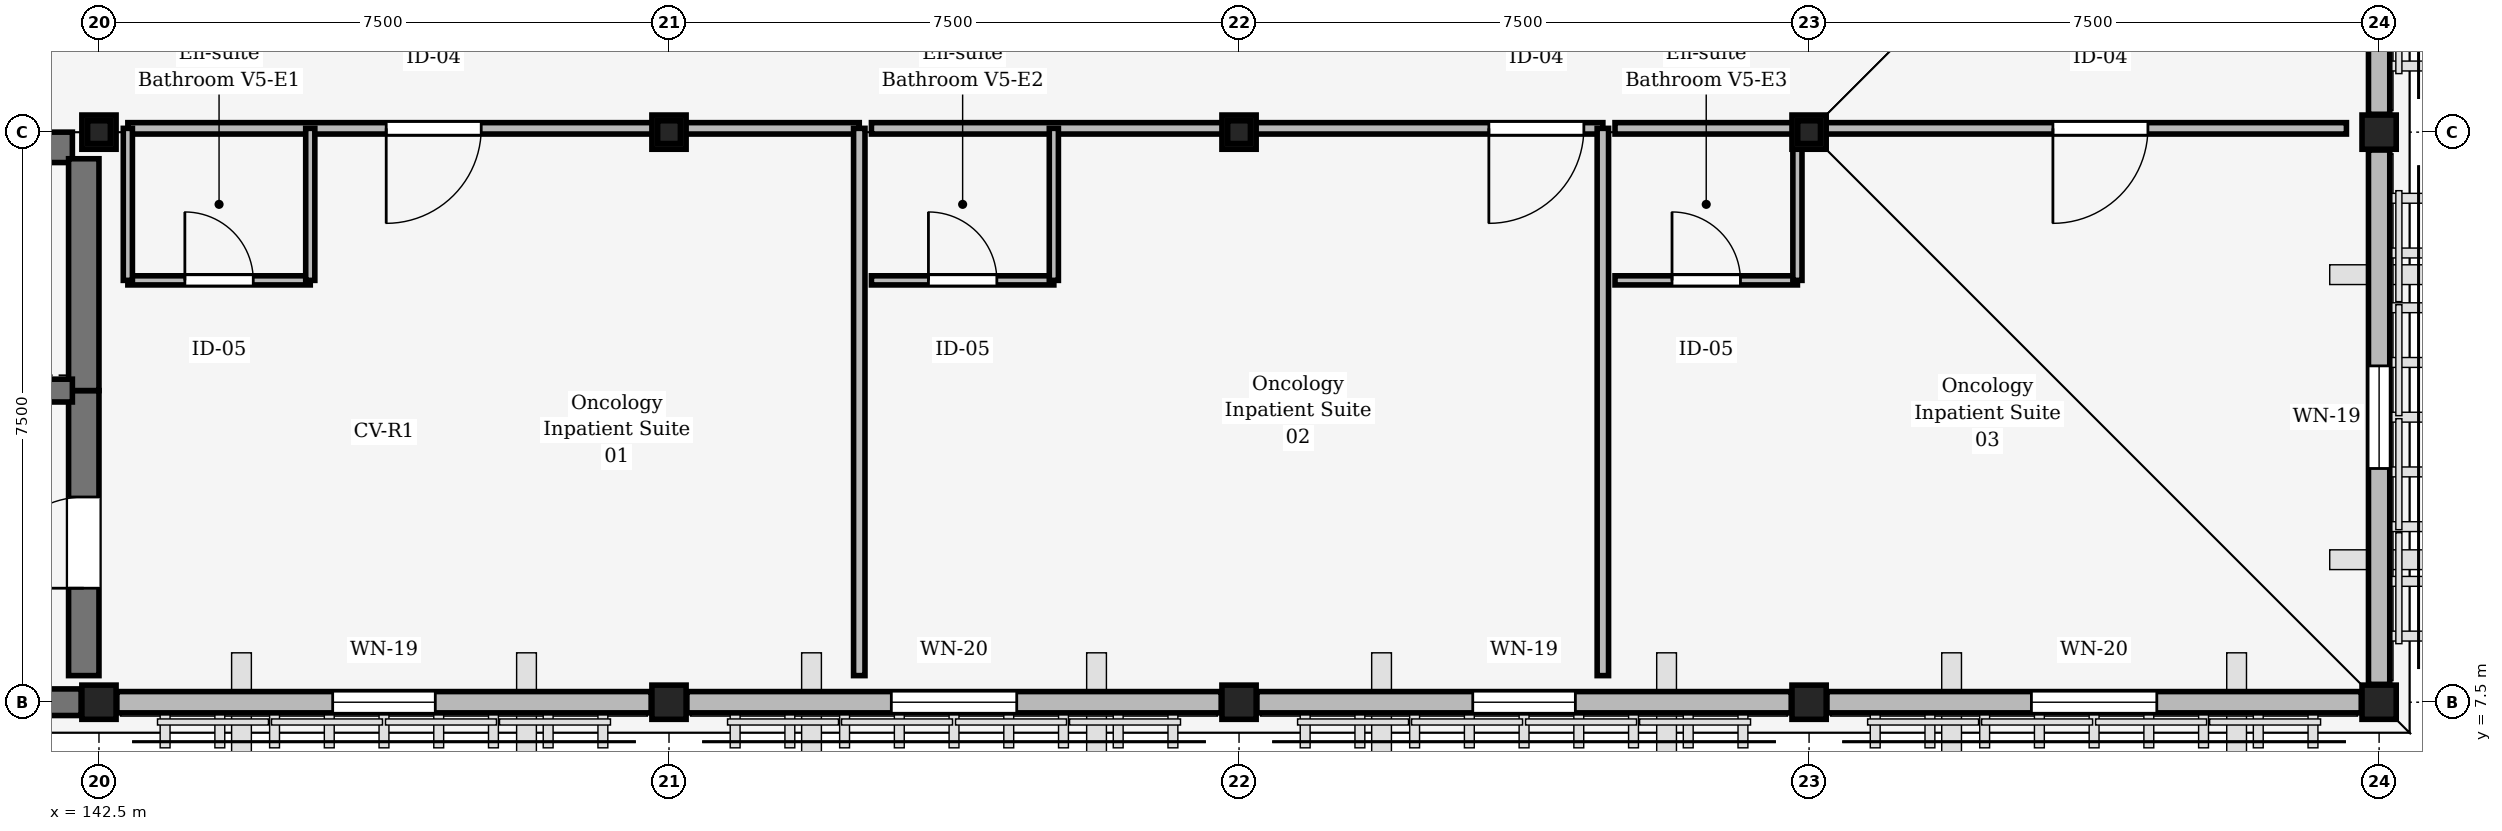
"""IFC4 building model, lengths in metres.
Left out: names, types, materials, properties, quantities, classifications, styles, units other than length and angle.
Written with IfcOpenShell. Run it as: python <this file> out.ifc"""

import sys

from ifc_helpers import new_model, si_unit, direction, frame, frame_2d, origin, origin_2d, place, context, subcontext, project, spatial, rectangle, i_section, extrude, element, fill, save


model = new_model("IFC4")
c1 = context("Model", 3, precision=1e-05, world=origin(), true_north=direction((0.0, 1.0)))
c2 = subcontext(c1, "Body", "Model", "MODEL_VIEW")
j1 = project(units=[si_unit("LENGTHUNIT", "METRE"), si_unit("PLANEANGLEUNIT", "RADIAN")], contexts=[c1])
p1 = place(None, origin())
s1 = spatial("IfcSite", under=j1, at=p1, CompositionType="ELEMENT")
p2 = place(p1, origin())
s2 = spatial("IfcBuilding", under=s1, at=p2, CompositionType="ELEMENT")
p3 = place(p2, frame((0.0, 0.0, 21.9)))
s3 = spatial("IfcBuildingStorey", under=s2, at=p3, CompositionType="ELEMENT", Elevation=21.9)
for number, where, z_axis, x_axis in (
    (1, (142.5, 7.5, 0.0), (0.0, 0.0, 1.0), (1.0, 0.0, 0.0)),
    (2, (142.5, 15.0, 0.0), (0.0, 0.0, 1.0), (1.0, 0.0, 0.0)),
    (3, (150.0, 7.5, 0.0), (0.0, 0.0, 1.0), (1.0, 0.0, 0.0)),
    (4, (150.0, 15.0, 0.0), (0.0, 0.0, 1.0), (1.0, 0.0, 0.0)),
    (5, (157.5, 7.5, 0.0), (0.0, 0.0, 1.0), (1.0, 0.0, 0.0)),
    (6, (157.5, 15.0, 0.0), (0.0, 0.0, 1.0), (1.0, 0.0, 0.0)),
    (7, (165.0, 7.5, 0.0), (0.0, 0.0, 1.0), (1.0, 0.0, 0.0)),
    (8, (165.0, 15.0, 0.0), (0.0, 0.0, 1.0), (1.0, 0.0, 0.0)),
    (9, (172.5, 7.5, 0.0), (0.0, 0.0, 1.0), (1.0, 0.0, 0.0)),
    (10, (172.5, 15.0, 0.0), (0.0, 0.0, 1.0), (1.0, 0.0, 0.0)),
):
    element("IfcColumn", number, at=place(p3, frame(where, z_axis=z_axis, x_axis=x_axis)), inside=s3, PredefinedType="COLUMN", context=c2, shape_type="SweptSolid", body=[
        extrude(rectangle(XDim=0.45, YDim=0.45, at=origin_2d()), origin(), (0.0, 0.0, 1.0), 4.05),
    ])
for number, where, z_axis, x_axis in (
    (11, (142.5, 15.0, 4.05), (0.0, 0.0, 1.0), (1.0, 0.0, 0.0)),
    (12, (150.0, 15.0, 4.05), (0.0, 0.0, 1.0), (1.0, 0.0, 0.0)),
    (13, (157.5, 15.0, 4.05), (0.0, 0.0, 1.0), (1.0, 0.0, 0.0)),
    (14, (165.0, 15.0, 4.05), (0.0, 0.0, 1.0), (1.0, 0.0, 0.0)),
):
    element("IfcColumn", number, at=place(p3, frame(where, z_axis=z_axis, x_axis=x_axis)), inside=s3, PredefinedType="COLUMN", context=c2, shape_type="SweptSolid", body=[
        extrude(i_section(OverallWidth=0.3, OverallDepth=0.3, WebThickness=0.011, FlangeThickness=0.019, FilletRadius=0.027, at=origin_2d()), origin(), (0.0, 0.0, 1.0), 1.97),
    ])
p4 = place(p3, frame((142.265, 7.5, 0.0), z_axis=(0.0, 0.0, 1.0), x_axis=(-1.0, 0.0, 0.0)))
e15 = element("IfcWall", 15, at=p4, inside=s3, PredefinedType="SHEAR", context=c2, shape_type="SweptSolid", body=[
    extrude(rectangle(XDim=7.03, YDim=0.35, at=frame_2d((3.515, 0.0))), origin(), (0.0, 0.0, 1.0), 3.77),
])
p5 = place(p3, frame((149.765, 7.5, 0.0), z_axis=(0.0, 0.0, 1.0), x_axis=(-1.0, 0.0, 0.0)))
e16 = element("IfcWall", 16, at=p5, inside=s3, PredefinedType="STANDARD", context=c2, shape_type="SweptSolid", body=[
    extrude(rectangle(XDim=7.03, YDim=0.28, at=frame_2d((3.515, 0.0))), origin(), (0.0, 0.0, 1.0), 3.77),
])
p6 = place(p5, frame((2.84, 0.0, 0.85)))
e17 = element("IfcOpeningElement", 17, at=p6, cuts=e16, PredefinedType="OPENING", context=c2, shape_type="SweptSolid", body=[
    extrude(rectangle(XDim=1.35, YDim=2.25, at=frame_2d((0.675, 1.125))), frame((0.0, 0.15, 0.0), z_axis=(0.0, -1.0, 0.0), x_axis=(1.0, 0.0, 0.0)), (0.0, 0.0, 1.0), 0.3),
])
p7 = place(p3, frame((157.265, 7.5, 0.0), z_axis=(0.0, 0.0, 1.0), x_axis=(-1.0, 0.0, 0.0)))
e18 = element("IfcWall", 18, at=p7, inside=s3, PredefinedType="STANDARD", context=c2, shape_type="SweptSolid", body=[
    extrude(rectangle(XDim=7.03, YDim=0.28, at=frame_2d((3.515, 0.0))), origin(), (0.0, 0.0, 1.0), 3.77),
])
p8 = place(p7, frame((2.69, 0.0, 0.85)))
e19 = element("IfcOpeningElement", 19, at=p8, cuts=e18, PredefinedType="OPENING", context=c2, shape_type="SweptSolid", body=[
    extrude(rectangle(XDim=1.65, YDim=2.25, at=frame_2d((0.825, 1.125))), frame((0.0, 0.15, 0.0), z_axis=(0.0, -1.0, 0.0), x_axis=(1.0, 0.0, 0.0)), (0.0, 0.0, 1.0), 0.3),
])
p9 = place(p3, frame((164.765, 7.5, 0.0), z_axis=(0.0, 0.0, 1.0), x_axis=(-1.0, 0.0, 0.0)))
e20 = element("IfcWall", 20, at=p9, inside=s3, PredefinedType="STANDARD", context=c2, shape_type="SweptSolid", body=[
    extrude(rectangle(XDim=7.03, YDim=0.28, at=frame_2d((3.515, 0.0))), origin(), (0.0, 0.0, 1.0), 3.77),
])
p10 = place(p9, frame((2.84, 0.0, 0.85)))
e21 = element("IfcOpeningElement", 21, at=p10, cuts=e20, PredefinedType="OPENING", context=c2, shape_type="SweptSolid", body=[
    extrude(rectangle(XDim=1.35, YDim=2.25, at=frame_2d((0.675, 1.125))), frame((0.0, 0.15, 0.0), z_axis=(0.0, -1.0, 0.0), x_axis=(1.0, 0.0, 0.0)), (0.0, 0.0, 1.0), 0.3),
])
p11 = place(p3, frame((172.265, 7.5, 0.0), z_axis=(0.0, 0.0, 1.0), x_axis=(-1.0, 0.0, 0.0)))
e22 = element("IfcWall", 22, at=p11, inside=s3, PredefinedType="STANDARD", context=c2, shape_type="SweptSolid", body=[
    extrude(rectangle(XDim=7.03, YDim=0.28, at=frame_2d((3.515, 0.0))), origin(), (0.0, 0.0, 1.0), 3.77),
])
p12 = place(p11, frame((2.69, 0.0, 0.85)))
e23 = element("IfcOpeningElement", 23, at=p12, cuts=e22, PredefinedType="OPENING", context=c2, shape_type="SweptSolid", body=[
    extrude(rectangle(XDim=1.65, YDim=2.25, at=frame_2d((0.825, 1.125))), frame((0.0, 0.15, 0.0), z_axis=(0.0, -1.0, 0.0), x_axis=(1.0, 0.0, 0.0)), (0.0, 0.0, 1.0), 0.3),
])
p13 = place(p3, frame((172.5, 14.765, 0.0), z_axis=(0.0, 0.0, 1.0), x_axis=(0.0, -1.0, 0.0)))
e24 = element("IfcWall", 24, at=p13, inside=s3, PredefinedType="STANDARD", context=c2, shape_type="SweptSolid", body=[
    extrude(rectangle(XDim=7.03, YDim=0.28, at=frame_2d((3.515, 0.0))), origin(), (0.0, 0.0, 1.0), 3.77),
])
p14 = place(p13, frame((2.84, 0.0, 0.85)))
e25 = element("IfcOpeningElement", 25, at=p14, cuts=e24, PredefinedType="OPENING", context=c2, shape_type="SweptSolid", body=[
    extrude(rectangle(XDim=1.35, YDim=2.25, at=frame_2d((0.675, 1.125))), frame((0.0, 0.15, 0.0), z_axis=(0.0, -1.0, 0.0), x_axis=(1.0, 0.0, 0.0)), (0.0, 0.0, 1.0), 0.3),
])
p15 = place(p3, frame((172.5, 22.265, 0.0), z_axis=(0.0, 0.0, 1.0), x_axis=(0.0, -1.0, 0.0)))
e26 = element("IfcWall", 26, at=p15, inside=s3, PredefinedType="STANDARD", context=c2, shape_type="SweptSolid", body=[
    extrude(rectangle(XDim=7.03, YDim=0.28, at=frame_2d((3.515, 0.0))), origin(), (0.0, 0.0, 1.0), 3.77),
])
p16 = place(p15, frame((2.69, 0.0, 0.85)))
e27 = element("IfcOpeningElement", 27, at=p16, cuts=e26, PredefinedType="OPENING", context=c2, shape_type="SweptSolid", body=[
    extrude(rectangle(XDim=1.65, YDim=2.25, at=frame_2d((0.825, 1.125))), frame((0.0, 0.15, 0.0), z_axis=(0.0, -1.0, 0.0), x_axis=(1.0, 0.0, 0.0)), (0.0, 0.0, 1.0), 0.3),
])
p17 = place(p3, frame((127.85, 14.8, 0.0), z_axis=(0.0, 0.0, 1.0), x_axis=(1.0, 0.0, 0.0)))
e28 = element("IfcWall", 28, at=p17, inside=s3, PredefinedType="SHEAR", context=c2, shape_type="SweptSolid", body=[
    extrude(rectangle(XDim=14.3, YDim=0.4, at=frame_2d((7.15, 0.0))), origin(), (0.0, 0.0, 1.0), 3.77),
])
p18 = place(p3, frame((142.3, 7.85, 0.0), z_axis=(0.0, 0.0, 1.0), x_axis=(0.0, 1.0, 0.0)))
e29 = element("IfcWall", 29, at=p18, inside=s3, PredefinedType="SHEAR", context=c2, shape_type="SweptSolid", body=[
    extrude(rectangle(XDim=3.75, YDim=0.4, at=frame_2d((1.875, 0.0))), origin(), (0.0, 0.0, 1.0), 3.77),
])
p19 = place(p18, frame((1.15, 0.0, 0.0)))
e30 = element("IfcOpeningElement", 30, at=p19, cuts=e29, PredefinedType="OPENING", context=c2, shape_type="SweptSolid", body=[
    extrude(rectangle(XDim=1.2, YDim=2.25, at=frame_2d((0.6, 1.125))), frame((0.0, 0.21, 0.0), z_axis=(0.0, -1.0, 0.0), x_axis=(1.0, 0.0, 0.0)), (0.0, 0.0, 1.0), 0.42),
])
p20 = place(p3, frame((142.3, 11.6, 0.0), z_axis=(0.0, 0.0, 1.0), x_axis=(0.0, 1.0, 0.0)))
e31 = element("IfcWall", 31, at=p20, inside=s3, PredefinedType="SHEAR", context=c2, shape_type="SweptSolid", body=[
    extrude(rectangle(XDim=3.05, YDim=0.4, at=frame_2d((1.525, 0.0))), origin(), (0.0, 0.0, 1.0), 3.77),
])
p21 = place(p3, frame((135.9, 11.6, 0.0), z_axis=(0.0, 0.0, 1.0), x_axis=(1.0, 0.0, 0.0)))
e32 = element("IfcWall", 32, at=p21, inside=s3, PredefinedType="SHEAR", context=c2, shape_type="SweptSolid", body=[
    extrude(rectangle(XDim=6.25, YDim=0.3, at=frame_2d((3.125, 0.0))), origin(), (0.0, 0.0, 1.0), 3.77),
])
p22 = place(p21, frame((0.95, 0.0, 0.0)))
e33 = element("IfcOpeningElement", 33, at=p22, cuts=e32, PredefinedType="OPENING", context=c2, shape_type="SweptSolid", body=[
    extrude(rectangle(XDim=1.3, YDim=2.2, at=frame_2d((0.65, 1.1))), frame((0.0, 0.16, 0.0), z_axis=(0.0, -1.0, 0.0), x_axis=(1.0, 0.0, 0.0)), (0.0, 0.0, 1.0), 0.32),
])
p23 = place(p21, frame((4.15, 0.0, 0.0)))
e34 = element("IfcOpeningElement", 34, at=p23, cuts=e32, PredefinedType="OPENING", context=c2, shape_type="SweptSolid", body=[
    extrude(rectangle(XDim=1.3, YDim=2.2, at=frame_2d((0.65, 1.1))), frame((0.0, 0.16, 0.0), z_axis=(0.0, -1.0, 0.0), x_axis=(1.0, 0.0, 0.0)), (0.0, 0.0, 1.0), 0.32),
])
p24 = place(p3, frame((152.503, 15.05, 0.0), z_axis=(0.0, 0.0, 1.0), x_axis=(-1.0, 0.0, 0.0)))
e35 = element("IfcWall", 35, at=p24, inside=s3, PredefinedType="PARTITIONING", context=c2, shape_type="SweptSolid", body=[
    extrude(rectangle(XDim=9.624, YDim=0.15, at=frame_2d((4.812, 0.0))), origin(), (0.0, 0.0, 1.0), 3.755),
])
p25 = place(p24, frame((4.974, 0.0, 0.0)))
e36 = element("IfcOpeningElement", 36, at=p25, cuts=e35, PredefinedType="OPENING", context=c2, shape_type="SweptSolid", body=[
    extrude(rectangle(XDim=1.25, YDim=2.2, at=frame_2d((0.625, 1.1))), frame((0.0, 0.085, 0.0), z_axis=(0.0, -1.0, 0.0), x_axis=(1.0, 0.0, 0.0)), (0.0, 0.0, 1.0), 0.17),
])
p26 = place(p3, frame((142.88, 13.05, 0.0), z_axis=(0.0, 0.0, 1.0), x_axis=(1.0, 0.0, 0.0)))
e37 = element("IfcWall", 37, at=p26, inside=s3, PredefinedType="PARTITIONING", context=c2, shape_type="SweptSolid", body=[
    extrude(rectangle(XDim=2.4, YDim=0.12, at=frame_2d((1.2, 0.0))), origin(), (0.0, 0.0, 1.0), 3.755),
])
p27 = place(p26, frame((0.75, 0.0, 0.0)))
e38 = element("IfcOpeningElement", 38, at=p27, cuts=e37, PredefinedType="OPENING", context=c2, shape_type="SweptSolid", body=[
    extrude(rectangle(XDim=0.9, YDim=2.1, at=frame_2d((0.45, 1.05))), frame((0.0, 0.07, 0.0), z_axis=(0.0, -1.0, 0.0), x_axis=(1.0, 0.0, 0.0)), (0.0, 0.0, 1.0), 0.14),
])
p28 = place(p3, frame((145.28, 13.05, 0.0), z_axis=(0.0, 0.0, 1.0), x_axis=(0.0, 1.0, 0.0)))
e39 = element("IfcWall", 39, at=p28, inside=s3, PredefinedType="PARTITIONING", context=c2, shape_type="SweptSolid", body=[
    extrude(rectangle(XDim=2.0, YDim=0.12, at=frame_2d((1.0, 0.0))), origin(), (0.0, 0.0, 1.0), 3.755),
])
p29 = place(p3, frame((162.287, 15.05, 0.0), z_axis=(0.0, 0.0, 1.0), x_axis=(-1.0, 0.0, 0.0)))
e40 = element("IfcWall", 40, at=p29, inside=s3, PredefinedType="PARTITIONING", context=c2, shape_type="SweptSolid", body=[
    extrude(rectangle(XDim=9.623, YDim=0.15, at=frame_2d((4.812, 0.0))), origin(), (0.0, 0.0, 1.0), 3.755),
])
p30 = place(p29, frame((0.25, 0.0, 0.0)))
e41 = element("IfcOpeningElement", 41, at=p30, cuts=e40, PredefinedType="OPENING", context=c2, shape_type="SweptSolid", body=[
    extrude(rectangle(XDim=1.25, YDim=2.2, at=frame_2d((0.625, 1.1))), frame((0.0, 0.085, 0.0), z_axis=(0.0, -1.0, 0.0), x_axis=(1.0, 0.0, 0.0)), (0.0, 0.0, 1.0), 0.17),
])
p31 = place(p3, frame((152.663, 13.05, 0.0), z_axis=(0.0, 0.0, 1.0), x_axis=(1.0, 0.0, 0.0)))
e42 = element("IfcWall", 42, at=p31, inside=s3, PredefinedType="PARTITIONING", context=c2, shape_type="SweptSolid", body=[
    extrude(rectangle(XDim=2.4, YDim=0.12, at=frame_2d((1.2, 0.0))), origin(), (0.0, 0.0, 1.0), 3.755),
])
p32 = place(p31, frame((0.75, 0.0, 0.0)))
e43 = element("IfcOpeningElement", 43, at=p32, cuts=e42, PredefinedType="OPENING", context=c2, shape_type="SweptSolid", body=[
    extrude(rectangle(XDim=0.9, YDim=2.1, at=frame_2d((0.45, 1.05))), frame((0.0, 0.07, 0.0), z_axis=(0.0, -1.0, 0.0), x_axis=(1.0, 0.0, 0.0)), (0.0, 0.0, 1.0), 0.14),
])
p33 = place(p3, frame((155.063, 13.05, 0.0), z_axis=(0.0, 0.0, 1.0), x_axis=(0.0, 1.0, 0.0)))
e44 = element("IfcWall", 44, at=p33, inside=s3, PredefinedType="PARTITIONING", context=c2, shape_type="SweptSolid", body=[
    extrude(rectangle(XDim=2.0, YDim=0.12, at=frame_2d((1.0, 0.0))), origin(), (0.0, 0.0, 1.0), 3.755),
])
p34 = place(p3, frame((172.07, 15.05, 0.0), z_axis=(0.0, 0.0, 1.0), x_axis=(-1.0, 0.0, 0.0)))
e45 = element("IfcWall", 45, at=p34, inside=s3, PredefinedType="PARTITIONING", context=c2, shape_type="SweptSolid", body=[
    extrude(rectangle(XDim=9.623, YDim=0.15, at=frame_2d((4.812, 0.0))), origin(), (0.0, 0.0, 1.0), 3.755),
])
p35 = place(p34, frame((2.612, 0.0, 0.0)))
e46 = element("IfcOpeningElement", 46, at=p35, cuts=e45, PredefinedType="OPENING", context=c2, shape_type="SweptSolid", body=[
    extrude(rectangle(XDim=1.25, YDim=2.2, at=frame_2d((0.625, 1.1))), frame((0.0, 0.085, 0.0), z_axis=(0.0, -1.0, 0.0), x_axis=(1.0, 0.0, 0.0)), (0.0, 0.0, 1.0), 0.17),
])
p36 = place(p3, frame((162.447, 13.05, 0.0), z_axis=(0.0, 0.0, 1.0), x_axis=(1.0, 0.0, 0.0)))
e47 = element("IfcWall", 47, at=p36, inside=s3, PredefinedType="PARTITIONING", context=c2, shape_type="SweptSolid", body=[
    extrude(rectangle(XDim=2.4, YDim=0.12, at=frame_2d((1.2, 0.0))), origin(), (0.0, 0.0, 1.0), 3.755),
])
p37 = place(p36, frame((0.75, 0.0, 0.0)))
e48 = element("IfcOpeningElement", 48, at=p37, cuts=e47, PredefinedType="OPENING", context=c2, shape_type="SweptSolid", body=[
    extrude(rectangle(XDim=0.9, YDim=2.1, at=frame_2d((0.45, 1.05))), frame((0.0, 0.07, 0.0), z_axis=(0.0, -1.0, 0.0), x_axis=(1.0, 0.0, 0.0)), (0.0, 0.0, 1.0), 0.14),
])
p38 = place(p3, frame((164.847, 13.05, 0.0), z_axis=(0.0, 0.0, 1.0), x_axis=(0.0, 1.0, 0.0)))
e49 = element("IfcWall", 49, at=p38, inside=s3, PredefinedType="PARTITIONING", context=c2, shape_type="SweptSolid", body=[
    extrude(rectangle(XDim=2.0, YDim=0.12, at=frame_2d((1.0, 0.0))), origin(), (0.0, 0.0, 1.0), 3.755),
])
for number, where, z_axis, x_axis in (
    (50, (152.503, 7.85, 0.0), (0.0, 0.0, 1.0), (0.0, 1.0, 0.0)),
    (51, (162.287, 7.85, 0.0), (0.0, 0.0, 1.0), (0.0, 1.0, 0.0)),
):
    element("IfcWall", number, at=place(p3, frame(where, z_axis=z_axis, x_axis=x_axis)), inside=s3, PredefinedType="PARTITIONING", context=c2, shape_type="SweptSolid", body=[
        extrude(rectangle(XDim=7.2, YDim=0.15, at=frame_2d((3.6, 0.0))), origin(), (0.0, 0.0, 1.0), 3.755),
    ])
p39 = place(p3, frame((142.88, 13.05, 0.0), z_axis=(0.0, 0.0, 1.0), x_axis=(0.0, 1.0, 0.0)))
e52 = element("IfcWall", 52, at=p39, inside=s3, PredefinedType="PARTITIONING", context=c2, shape_type="SweptSolid", body=[
    extrude(rectangle(XDim=2.0, YDim=0.12, at=frame_2d((1.0, 0.0))), origin(), (0.0, 0.0, 1.0), 3.755),
])
p40 = place(p6, origin())
e53 = element("IfcWindow", 53, at=p40, inside=s3, PartitioningType="SINGLE_PANEL", PredefinedType="WINDOW", context=c2, shape_type="SweptSolid", body=[
    extrude(rectangle(XDim=1.35, YDim=2.25, at=frame_2d((0.675, 1.125))), frame((0.0, 0.03, 0.0), z_axis=(0.0, -1.0, 0.0), x_axis=(1.0, 0.0, 0.0)), (0.0, 0.0, 1.0), 0.06),
])
fill(e17, e53)
p41 = place(p8, origin())
e54 = element("IfcWindow", 54, at=p41, inside=s3, PartitioningType="SINGLE_PANEL", PredefinedType="WINDOW", context=c2, shape_type="SweptSolid", body=[
    extrude(rectangle(XDim=1.65, YDim=2.25, at=frame_2d((0.825, 1.125))), frame((0.0, 0.03, 0.0), z_axis=(0.0, -1.0, 0.0), x_axis=(1.0, 0.0, 0.0)), (0.0, 0.0, 1.0), 0.06),
])
fill(e19, e54)
p42 = place(p10, origin())
e55 = element("IfcWindow", 55, at=p42, inside=s3, PartitioningType="SINGLE_PANEL", PredefinedType="WINDOW", context=c2, shape_type="SweptSolid", body=[
    extrude(rectangle(XDim=1.35, YDim=2.25, at=frame_2d((0.675, 1.125))), frame((0.0, 0.03, 0.0), z_axis=(0.0, -1.0, 0.0), x_axis=(1.0, 0.0, 0.0)), (0.0, 0.0, 1.0), 0.06),
])
fill(e21, e55)
p43 = place(p12, origin())
e56 = element("IfcWindow", 56, at=p43, inside=s3, PartitioningType="SINGLE_PANEL", PredefinedType="WINDOW", context=c2, shape_type="SweptSolid", body=[
    extrude(rectangle(XDim=1.65, YDim=2.25, at=frame_2d((0.825, 1.125))), frame((0.0, 0.03, 0.0), z_axis=(0.0, -1.0, 0.0), x_axis=(1.0, 0.0, 0.0)), (0.0, 0.0, 1.0), 0.06),
])
fill(e23, e56)
p44 = place(p14, origin())
e57 = element("IfcWindow", 57, at=p44, inside=s3, PartitioningType="SINGLE_PANEL", PredefinedType="WINDOW", context=c2, shape_type="SweptSolid", body=[
    extrude(rectangle(XDim=1.35, YDim=2.25, at=frame_2d((0.675, 1.125))), frame((0.0, 0.03, 0.0), z_axis=(0.0, -1.0, 0.0), x_axis=(1.0, 0.0, 0.0)), (0.0, 0.0, 1.0), 0.06),
])
fill(e25, e57)
p45 = place(p19, origin())
e58 = element("IfcDoor", 58, at=p45, inside=s3, OperationType="SINGLE_SWING_LEFT", PredefinedType="DOOR", context=c2, shape_type="SweptSolid", body=[
    extrude(rectangle(XDim=1.2, YDim=2.25, at=frame_2d((0.6, 1.125))), frame((0.0, 0.025, 0.0), z_axis=(0.0, -1.0, 0.0), x_axis=(1.0, 0.0, 0.0)), (0.0, 0.0, 1.0), 0.05),
])
fill(e30, e58)
p46 = place(p25, origin())
e59 = element("IfcDoor", 59, at=p46, inside=s3, OperationType="SINGLE_SWING_RIGHT", PredefinedType="DOOR", context=c2, shape_type="SweptSolid", body=[
    extrude(rectangle(XDim=1.25, YDim=2.2, at=frame_2d((0.625, 1.1))), frame((0.0, 0.025, 0.0), z_axis=(0.0, -1.0, 0.0), x_axis=(1.0, 0.0, 0.0)), (0.0, 0.0, 1.0), 0.05),
])
fill(e36, e59)
p47 = place(p27, origin())
e60 = element("IfcDoor", 60, at=p47, inside=s3, OperationType="SINGLE_SWING_LEFT", PredefinedType="DOOR", context=c2, shape_type="SweptSolid", body=[
    extrude(rectangle(XDim=0.9, YDim=2.1, at=frame_2d((0.45, 1.05))), frame((0.0, 0.025, 0.0), z_axis=(0.0, -1.0, 0.0), x_axis=(1.0, 0.0, 0.0)), (0.0, 0.0, 1.0), 0.05),
])
fill(e38, e60)
p48 = place(p30, origin())
e61 = element("IfcDoor", 61, at=p48, inside=s3, OperationType="SINGLE_SWING_RIGHT", PredefinedType="DOOR", context=c2, shape_type="SweptSolid", body=[
    extrude(rectangle(XDim=1.25, YDim=2.2, at=frame_2d((0.625, 1.1))), frame((0.0, 0.025, 0.0), z_axis=(0.0, -1.0, 0.0), x_axis=(1.0, 0.0, 0.0)), (0.0, 0.0, 1.0), 0.05),
])
fill(e41, e61)
p49 = place(p32, origin())
e62 = element("IfcDoor", 62, at=p49, inside=s3, OperationType="SINGLE_SWING_LEFT", PredefinedType="DOOR", context=c2, shape_type="SweptSolid", body=[
    extrude(rectangle(XDim=0.9, YDim=2.1, at=frame_2d((0.45, 1.05))), frame((0.0, 0.025, 0.0), z_axis=(0.0, -1.0, 0.0), x_axis=(1.0, 0.0, 0.0)), (0.0, 0.0, 1.0), 0.05),
])
fill(e43, e62)
p50 = place(p35, origin())
e63 = element("IfcDoor", 63, at=p50, inside=s3, OperationType="SINGLE_SWING_RIGHT", PredefinedType="DOOR", context=c2, shape_type="SweptSolid", body=[
    extrude(rectangle(XDim=1.25, YDim=2.2, at=frame_2d((0.625, 1.1))), frame((0.0, 0.025, 0.0), z_axis=(0.0, -1.0, 0.0), x_axis=(1.0, 0.0, 0.0)), (0.0, 0.0, 1.0), 0.05),
])
fill(e46, e63)
p51 = place(p37, origin())
e64 = element("IfcDoor", 64, at=p51, inside=s3, OperationType="SINGLE_SWING_LEFT", PredefinedType="DOOR", context=c2, shape_type="SweptSolid", body=[
    extrude(rectangle(XDim=0.9, YDim=2.1, at=frame_2d((0.45, 1.05))), frame((0.0, 0.025, 0.0), z_axis=(0.0, -1.0, 0.0), x_axis=(1.0, 0.0, 0.0)), (0.0, 0.0, 1.0), 0.05),
])
fill(e48, e64)
save(model, sys.argv[1])
